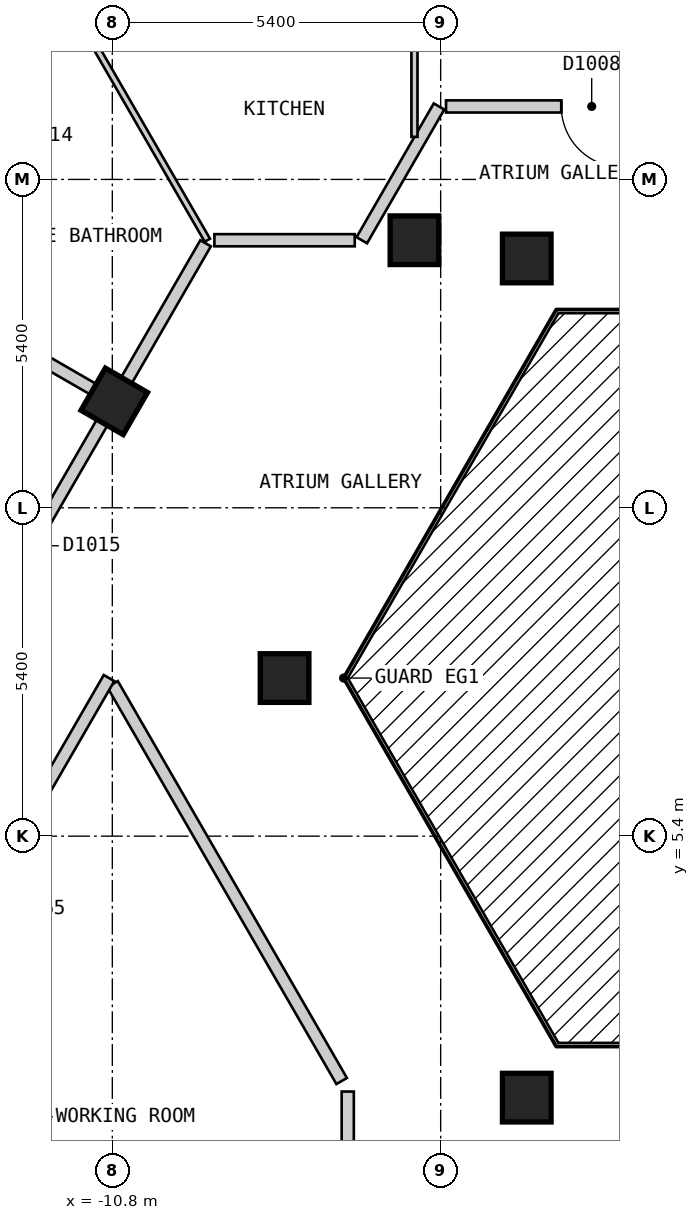
"""IFC4 building model, lengths in metres.
Left out: names, types, materials, properties, quantities, classifications, styles, units other than length and angle.
Written with IfcOpenShell. Run it as: python <this file> out.ifc"""

import sys

from ifc_helpers import new_model, si_unit, direction, frame, frame_2d, origin, origin_2d, place, context, subcontext, project, spatial, rectangle, extrude, element, fill, save


model = new_model("IFC4")
c1 = context("Model", 3, precision=1e-05, world=origin(), true_north=direction((0.0, 1.0)))
c2 = subcontext(c1, "Body", "Model", "MODEL_VIEW")
j1 = project(units=[si_unit("LENGTHUNIT", "METRE"), si_unit("PLANEANGLEUNIT", "RADIAN")], contexts=[c1])
p1 = place(None, origin())
s1 = spatial("IfcSite", under=j1, at=p1, CompositionType="ELEMENT")
p2 = place(p1, origin())
s2 = spatial("IfcBuilding", under=s1, at=p2, CompositionType="ELEMENT")
p3 = place(p2, frame((0.0, 0.0, 126.6)))
s3 = spatial("IfcBuildingStorey", under=s2, at=p3, CompositionType="ELEMENT", Elevation=126.6)
for number, where, z_axis, x_axis in (
    (1, (-3.984, 14.9, 0.0), (0.0, 0.0, 1.0), (1.0, 0.0, 0.0)),
    (2, (-5.831, 15.2, 0.0), (0.0, 0.0, 1.0), (-1.0, 0.0, 0.0)),
    (3, (-10.768, 12.55, 0.0), (0.0, 0.0, 1.0), (-0.5, -0.866, 0.0)),
    (4, (-7.967, 8.0, 0.0), (0.0, 0.0, 1.0), (1.0, 0.0, 0.0)),
    (5, (-3.984, 1.1, 0.0), (0.0, 0.0, 1.0), (1.0, 0.0, 0.0)),
):
    element("IfcColumn", number, at=place(p3, frame(where, z_axis=z_axis, x_axis=x_axis)), inside=s3, PredefinedType="COLUMN", context=c2, shape_type="SweptSolid", body=[
        extrude(rectangle(XDim=0.8, YDim=0.8, at=origin_2d()), origin(), (0.0, 0.0, 1.0), 3.0),
    ])
p4 = place(p3, frame((-10.796, 7.9, 0.0), z_axis=(0.0, 0.0, 1.0), x_axis=(0.499954271211, -0.866051803703, 0.0)))
e6 = element("IfcWall", 6, at=p4, inside=s3, PredefinedType="PARTITIONING", context=c2, shape_type="SweptSolid", body=[
    extrude(rectangle(XDim=7.536, YDim=0.2, at=frame_2d((3.768, 0.0))), origin(), (0.0, 0.0, 1.0), 2.7),
])
p5 = place(p3, frame((-9.121, 15.2, 0.0), z_axis=(0.0, 0.0, 1.0), x_axis=(1.0, 0.0, 0.0)))
e7 = element("IfcWall", 7, at=p5, inside=s3, PredefinedType="PARTITIONING", context=c2, shape_type="SweptSolid", body=[
    extrude(rectangle(XDim=2.308, YDim=0.2, at=frame_2d((1.154, 0.0))), origin(), (0.0, 0.0, 1.0), 2.7),
])
p6 = place(p3, frame((-5.312, 17.4, 0.0), z_axis=(0.0, 0.0, 1.0), x_axis=(1.0, 0.0, 0.0)))
e8 = element("IfcWall", 8, at=p6, inside=s3, PredefinedType="PARTITIONING", context=c2, shape_type="SweptSolid", body=[
    extrude(rectangle(XDim=10.739, YDim=0.2, at=frame_2d((5.37, 0.0))), origin(), (0.0, 0.0, 1.0), 2.7),
])
p7 = place(p6, frame((1.896, 0.0, 0.0)))
e9 = element("IfcOpeningElement", 9, at=p7, cuts=e8, PredefinedType="OPENING", context=c2, shape_type="SweptSolid", body=[
    extrude(rectangle(XDim=1.0, YDim=2.1, at=frame_2d((0.5, 1.05))), frame((0.0, 0.11, 0.0), z_axis=(0.0, -1.0, 0.0), x_axis=(1.0, 0.0, 0.0)), (0.0, 0.0, 1.0), 0.22),
])
p8 = place(p3, frame((-15.242, 0.399, 0.0), z_axis=(0.0, 0.0, 1.0), x_axis=(0.499953615651, 0.866052182145, 0.0)))
e10 = element("IfcWall", 10, at=p8, inside=s3, PredefinedType="PARTITIONING", context=c2, shape_type="SweptSolid", body=[
    extrude(rectangle(XDim=8.777, YDim=0.2, at=frame_2d((4.388, 0.0))), origin(), (0.0, 0.0, 1.0), 2.7),
])
p9 = place(p8, frame((3.938, 0.0, 0.0)))
e11 = element("IfcOpeningElement", 11, at=p9, cuts=e10, PredefinedType="OPENING", context=c2, shape_type="SweptSolid", body=[
    extrude(rectangle(XDim=0.9, YDim=2.1, at=frame_2d((0.45, 1.05))), frame((0.0, 0.11, 0.0), z_axis=(0.0, -1.0, 0.0), x_axis=(1.0, 0.0, 0.0)), (0.0, 0.0, 1.0), 0.22),
])
p10 = place(p3, frame((-6.697, 15.2, 0.0), z_axis=(0.0, 0.0, 1.0), x_axis=(0.499963722229, 0.866046347752, 0.0)))
e12 = element("IfcWall", 12, at=p10, inside=s3, PredefinedType="PARTITIONING", context=c2, shape_type="SweptSolid", body=[
    extrude(rectangle(XDim=2.54, YDim=0.2, at=frame_2d((1.27, 0.0))), origin(), (0.0, 0.0, 1.0), 2.7),
])
p11 = place(p3, frame((-17.753, 0.45, 0.0), z_axis=(0.0, 0.0, 1.0), x_axis=(0.499990970252, 0.866030617049, 0.0)))
e13 = element("IfcWall", 13, at=p11, inside=s3, PredefinedType="PARTITIONING", context=c2, shape_type="SweptSolid", body=[
    extrude(rectangle(XDim=16.974, YDim=0.2, at=frame_2d((8.487, 0.0))), origin(), (0.0, 0.0, 1.0), 2.7),
])
p12 = place(p11, frame((10.73, 0.0, 0.0)))
e14 = element("IfcOpeningElement", 14, at=p12, cuts=e13, PredefinedType="OPENING", context=c2, shape_type="SweptSolid", body=[
    extrude(rectangle(XDim=1.0, YDim=2.1, at=frame_2d((0.5, 1.05))), frame((0.0, 0.11, 0.0), z_axis=(0.0, -1.0, 0.0), x_axis=(1.0, 0.0, 0.0)), (0.0, 0.0, 1.0), 0.22),
])
p13 = place(p11, frame((5.245, 0.0, 0.0)))
e15 = element("IfcOpeningElement", 15, at=p13, cuts=e13, PredefinedType="OPENING", context=c2, shape_type="SweptSolid", body=[
    extrude(rectangle(XDim=1.0, YDim=2.1, at=frame_2d((0.5, 1.05))), frame((0.0, 0.11, 0.0), z_axis=(0.0, -1.0, 0.0), x_axis=(1.0, 0.0, 0.0)), (0.0, 0.0, 1.0), 0.22),
])
p14 = place(p11, frame((0.594, 0.0, 0.0)))
e16 = element("IfcOpeningElement", 16, at=p14, cuts=e13, PredefinedType="OPENING", context=c2, shape_type="SweptSolid", body=[
    extrude(rectangle(XDim=1.0, YDim=2.1, at=frame_2d((0.5, 1.05))), frame((0.0, 0.11, 0.0), z_axis=(0.0, -1.0, 0.0), x_axis=(1.0, 0.0, 0.0)), (0.0, 0.0, 1.0), 0.22),
])
p15 = place(p3, frame((-6.928, -2.8, 0.0), z_axis=(0.0, 0.0, 1.0), x_axis=(0.0, 1.0, 0.0)))
e17 = element("IfcWall", 17, at=p15, inside=s3, PredefinedType="PARTITIONING", context=c2, shape_type="SweptSolid", body=[
    extrude(rectangle(XDim=4.0, YDim=0.2, at=frame_2d((2.0, 0.0))), origin(), (0.0, 0.0, 1.0), 2.7),
])
p16 = place(p3, frame((-14.37, 24.09, 0.0), z_axis=(0.0, 0.0, 1.0), x_axis=(0.50002438799, -0.866011322914, 0.0)))
e18 = element("IfcWall", 18, at=p16, inside=s3, PredefinedType="PARTITIONING", context=c2, shape_type="SweptSolid", body=[
    extrude(rectangle(XDim=10.266, YDim=0.1, at=frame_2d((5.133, 0.0))), origin(), (0.0, 0.0, 1.0), 2.7),
])
p17 = place(p16, frame((2.347, 0.0, 0.0)))
e19 = element("IfcOpeningElement", 19, at=p17, cuts=e18, PredefinedType="OPENING", context=c2, shape_type="SweptSolid", body=[
    extrude(rectangle(XDim=0.9, YDim=2.1, at=frame_2d((0.45, 1.05))), frame((0.0, 0.06, 0.0), z_axis=(0.0, -1.0, 0.0), x_axis=(1.0, 0.0, 0.0)), (0.0, 0.0, 1.0), 0.12),
])
p18 = place(p3, frame((-13.987, 12.192, 0.0), z_axis=(0.0, 0.0, 1.0), x_axis=(0.865983051302, -0.500073349477, 0.0)))
e20 = element("IfcWall", 20, at=p18, inside=s3, PredefinedType="PARTITIONING", context=c2, shape_type="SweptSolid", body=[
    extrude(rectangle(XDim=2.509, YDim=0.1, at=frame_2d((1.255, 0.0))), origin(), (0.0, 0.0, 1.0), 2.7),
])
p19 = place(p18, frame((0.829, 0.0, 0.0)))
e21 = element("IfcOpeningElement", 21, at=p19, cuts=e20, PredefinedType="OPENING", context=c2, shape_type="SweptSolid", body=[
    extrude(rectangle(XDim=0.9, YDim=2.1, at=frame_2d((0.45, 1.05))), frame((0.0, 0.06, 0.0), z_axis=(0.0, -1.0, 0.0), x_axis=(1.0, 0.0, 0.0)), (0.0, 0.0, 1.0), 0.12),
])
p20 = place(p3, frame((-14.222, 14.659, 0.0), z_axis=(0.0, 0.0, 1.0), x_axis=(0.500053212623, 0.865994679283, 0.0)))
e22 = element("IfcWall", 22, at=p20, inside=s3, PredefinedType="PARTITIONING", context=c2, shape_type="SweptSolid", body=[
    extrude(rectangle(XDim=5.239, YDim=0.1, at=frame_2d((2.62, 0.0))), origin(), (0.0, 0.0, 1.0), 2.7),
])
p21 = place(p20, frame((2.198, 0.0, 0.0)))
e23 = element("IfcOpeningElement", 23, at=p21, cuts=e22, PredefinedType="OPENING", context=c2, shape_type="SweptSolid", body=[
    extrude(rectangle(XDim=0.8, YDim=2.1, at=frame_2d((0.4, 1.05))), frame((0.0, 0.06, 0.0), z_axis=(0.0, -1.0, 0.0), x_axis=(1.0, 0.0, 0.0)), (0.0, 0.0, 1.0), 0.12),
])
p22 = place(p3, frame((-5.831, 16.9, 0.0), z_axis=(0.0, 0.0, 1.0), x_axis=(0.0, 1.0, 0.0)))
e24 = element("IfcWall", 24, at=p22, inside=s3, PredefinedType="PARTITIONING", context=c2, shape_type="SweptSolid", body=[
    extrude(rectangle(XDim=4.546, YDim=0.1, at=frame_2d((2.273, 0.0))), origin(), (0.0, 0.0, 1.0), 2.7),
])
p23 = place(p22, frame((1.723, 0.0, 0.0)))
e25 = element("IfcOpeningElement", 25, at=p23, cuts=e24, PredefinedType="OPENING", context=c2, shape_type="SweptSolid", body=[
    extrude(rectangle(XDim=0.9, YDim=2.1, at=frame_2d((0.45, 1.05))), frame((0.0, 0.06, 0.0), z_axis=(0.0, -1.0, 0.0), x_axis=(1.0, 0.0, 0.0)), (0.0, 0.0, 1.0), 0.12),
])
p24 = place(p3, frame((-19.514, 17.599, 0.0), z_axis=(0.0, 0.0, 1.0), x_axis=(0.866059142644, -0.499941558027, 0.0)))
e26 = element("IfcWall", 26, at=p24, inside=s3, PredefinedType="PARTITIONING", context=c2, shape_type="SweptSolid", body=[
    extrude(rectangle(XDim=9.999, YDim=0.2, at=frame_2d((5.0, 0.0))), origin(), (0.0, 0.0, 1.0), 2.7),
])
p25 = place(p7, origin())
e27 = element("IfcDoor", 27, at=p25, inside=s3, OperationType="SINGLE_SWING_RIGHT", PredefinedType="DOOR", context=c2, shape_type="SweptSolid", body=[
    extrude(rectangle(XDim=1.0, YDim=2.1, at=frame_2d((0.5, 1.05))), frame((0.0, 0.025, 0.0), z_axis=(0.0, -1.0, 0.0), x_axis=(1.0, 0.0, 0.0)), (0.0, 0.0, 1.0), 0.05),
])
fill(e9, e27)
save(model, sys.argv[1])
